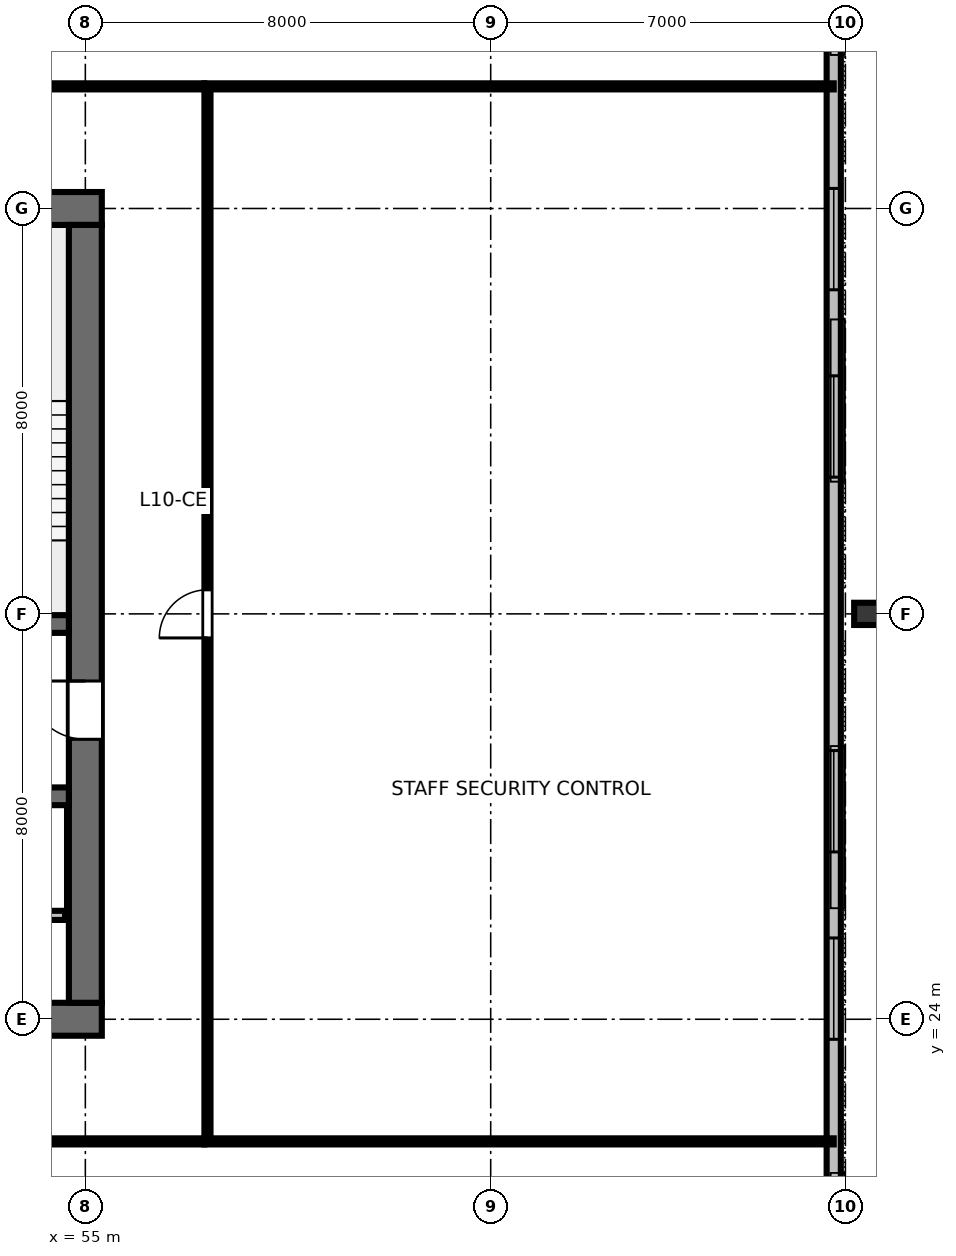
"""IFC4 building model, lengths in metres.
Left out: names, types, materials, properties, quantities, classifications, styles, units other than length and angle.
Written with IfcOpenShell. Run it as: python <this file> out.ifc"""

import sys

from ifc_helpers import new_model, si_unit, direction, frame, frame_2d, origin, origin_2d, place, context, subcontext, project, spatial, rectangle, i_section, extrude, element, fill, save


model = new_model("IFC4")
c1 = context("Model", 3, precision=1e-05, world=origin(), true_north=direction((0.0, 1.0)))
c2 = subcontext(c1, "Body", "Model", "MODEL_VIEW")
j1 = project(units=[si_unit("LENGTHUNIT", "METRE"), si_unit("PLANEANGLEUNIT", "RADIAN")], contexts=[c1])
p1 = place(None, origin())
s1 = spatial("IfcSite", under=j1, at=p1, CompositionType="ELEMENT")
p2 = place(p1, origin())
s2 = spatial("IfcBuilding", under=s1, at=p2, CompositionType="ELEMENT")
p3 = place(p2, frame((0.0, 0.0, 42.4)))
s3 = spatial("IfcBuildingStorey", under=s2, at=p3, CompositionType="ELEMENT", Elevation=42.4)
p4 = place(p3, frame((36.675, 24.0, 0.0), z_axis=(0.0, 0.0, 1.0), x_axis=(1.0, 0.0, 0.0)))
e1 = element("IfcWall", 1, at=p4, inside=s3, PredefinedType="SHEAR", context=c2, shape_type="SweptSolid", body=[
    extrude(rectangle(XDim=18.65, YDim=0.65, at=frame_2d((9.325, 0.0))), origin(), (0.0, 0.0, 1.0), 3.36),
])
p5 = place(p4, frame((5.725, 0.0, 0.0)))
e2 = element("IfcOpeningElement", 2, at=p5, cuts=e1, PredefinedType="OPENING", context=c2, shape_type="SweptSolid", body=[
    extrude(rectangle(XDim=1.6, YDim=2.15, at=frame_2d((0.8, 1.075))), frame((0.0, 0.335, 0.0), z_axis=(0.0, -1.0, 0.0), x_axis=(1.0, 0.0, 0.0)), (0.0, 0.0, 1.0), 0.67),
])
p6 = place(p4, frame((12.125, 0.0, 0.0)))
e3 = element("IfcOpeningElement", 3, at=p6, cuts=e1, PredefinedType="OPENING", context=c2, shape_type="SweptSolid", body=[
    extrude(rectangle(XDim=1.6, YDim=2.15, at=frame_2d((0.8, 1.075))), frame((0.0, 0.335, 0.0), z_axis=(0.0, -1.0, 0.0), x_axis=(1.0, 0.0, 0.0)), (0.0, 0.0, 1.0), 0.67),
])
p7 = place(p3, frame((36.675, 40.0, 0.0), z_axis=(0.0, 0.0, 1.0), x_axis=(1.0, 0.0, 0.0)))
e4 = element("IfcWall", 4, at=p7, inside=s3, PredefinedType="SHEAR", context=c2, shape_type="SweptSolid", body=[
    extrude(rectangle(XDim=18.65, YDim=0.65, at=frame_2d((9.325, 0.0))), origin(), (0.0, 0.0, 1.0), 3.36),
])
p8 = place(p7, frame((10.625, 0.0, 0.0)))
e5 = element("IfcOpeningElement", 5, at=p8, cuts=e4, PredefinedType="OPENING", context=c2, shape_type="SweptSolid", body=[
    extrude(rectangle(XDim=1.0, YDim=2.15, at=frame_2d((0.5, 1.075))), frame((0.0, 0.335, 0.0), z_axis=(0.0, -1.0, 0.0), x_axis=(1.0, 0.0, 0.0)), (0.0, 0.0, 1.0), 0.67),
])
p9 = place(p3, frame((55.0, 24.325, 0.0), z_axis=(0.0, 0.0, 1.0), x_axis=(0.0, 1.0, 0.0)))
e6 = element("IfcWall", 6, at=p9, inside=s3, PredefinedType="SHEAR", context=c2, shape_type="SweptSolid", body=[
    extrude(rectangle(XDim=15.35, YDim=0.65, at=frame_2d((7.675, 0.0))), origin(), (0.0, 0.0, 1.0), 3.36),
])
p10 = place(p9, frame((5.2, 0.0, 0.0)))
e7 = element("IfcOpeningElement", 7, at=p10, cuts=e6, PredefinedType="OPENING", context=c2, shape_type="SweptSolid", body=[
    extrude(rectangle(XDim=1.15, YDim=2.15, at=frame_2d((0.575, 1.075))), frame((0.0, 0.335, 0.0), z_axis=(0.0, -1.0, 0.0), x_axis=(1.0, 0.0, 0.0)), (0.0, 0.0, 1.0), 0.67),
])
p11 = place(p3, frame((37.325, 31.8, 0.0), z_axis=(0.0, 0.0, 1.0), x_axis=(1.0, 0.0, 0.0)))
e8 = element("IfcWall", 8, at=p11, inside=s3, PredefinedType="SHEAR", context=c2, shape_type="SweptSolid", body=[
    extrude(rectangle(XDim=17.35, YDim=0.35, at=frame_2d((8.675, 0.0))), origin(), (0.0, 0.0, 1.0), 3.36),
])
p12 = place(p11, frame((0.725, 0.0, 0.0)))
e9 = element("IfcOpeningElement", 9, at=p12, cuts=e8, PredefinedType="OPENING", context=c2, shape_type="SweptSolid", body=[
    extrude(rectangle(XDim=1.1, YDim=2.15, at=frame_2d((0.55, 1.075))), frame((0.0, 0.185, 0.0), z_axis=(0.0, -1.0, 0.0), x_axis=(1.0, 0.0, 0.0)), (0.0, 0.0, 1.0), 0.37),
])
p13 = place(p11, frame((14.625, 0.0, 0.0)))
e10 = element("IfcOpeningElement", 10, at=p13, cuts=e8, PredefinedType="OPENING", context=c2, shape_type="SweptSolid", body=[
    extrude(rectangle(XDim=1.1, YDim=2.15, at=frame_2d((0.55, 1.075))), frame((0.0, 0.185, 0.0), z_axis=(0.0, -1.0, 0.0), x_axis=(1.0, 0.0, 0.0)), (0.0, 0.0, 1.0), 0.37),
])
p14 = place(p3, frame((37.325, 28.4, 0.0), z_axis=(0.0, 0.0, 1.0), x_axis=(1.0, 0.0, 0.0)))
e11 = element("IfcWall", 11, at=p14, inside=s3, PredefinedType="SHEAR", context=c2, shape_type="SweptSolid", body=[
    extrude(rectangle(XDim=17.35, YDim=0.35, at=frame_2d((8.675, 0.0))), origin(), (0.0, 0.0, 1.0), 3.36),
])
p15 = place(p3, frame((70.43, 32.0, 0.0), z_axis=(0.0, 0.0, 1.0), x_axis=(0.0, 1.0, 0.0)))
e12 = element("IfcColumn", 12, at=p15, inside=s3, PredefinedType="COLUMN", context=c2, shape_type="SweptSolid", body=[
    extrude(i_section(OverallWidth=0.439, OverallDepth=0.514, WebThickness=0.06, FlangeThickness=0.097, FilletRadius=0.025, at=origin_2d()), origin(), (0.0, 0.0, 1.0), 3.148),
])
p16 = place(p3, frame((69.77, 14.26, 0.0), z_axis=(0.0, 0.0, 1.0), x_axis=(0.0, 1.0, 0.0)))
e13 = element("IfcWall", 13, at=p16, inside=s3, PredefinedType="STANDARD", context=c2, shape_type="SweptSolid", body=[
    extrude(rectangle(XDim=35.48, YDim=0.28, at=frame_2d((17.74, 0.0))), origin(), (0.0, 0.0, 1.0), 3.15),
])
p17 = place(p16, frame((1.949, 0.0, 0.8)))
e14 = element("IfcOpeningElement", 14, at=p17, cuts=e13, PredefinedType="OPENING", context=c2, shape_type="SweptSolid", body=[
    extrude(rectangle(XDim=2.0, YDim=1.95, at=frame_2d((1.0, 0.975))), frame((0.0, 0.15, 0.0), z_axis=(0.0, -1.0, 0.0), x_axis=(1.0, 0.0, 0.0)), (0.0, 0.0, 1.0), 0.3),
])
p18 = place(p16, frame((9.344, 0.0, 0.8)))
e15 = element("IfcOpeningElement", 15, at=p18, cuts=e13, PredefinedType="OPENING", context=c2, shape_type="SweptSolid", body=[
    extrude(rectangle(XDim=2.0, YDim=1.95, at=frame_2d((1.0, 0.975))), frame((0.0, 0.15, 0.0), z_axis=(0.0, -1.0, 0.0), x_axis=(1.0, 0.0, 0.0)), (0.0, 0.0, 1.0), 0.3),
])
p19 = place(p16, frame((13.042, 0.0, 0.8)))
e16 = element("IfcOpeningElement", 16, at=p19, cuts=e13, PredefinedType="OPENING", context=c2, shape_type="SweptSolid", body=[
    extrude(rectangle(XDim=2.0, YDim=1.95, at=frame_2d((1.0, 0.975))), frame((0.0, 0.15, 0.0), z_axis=(0.0, -1.0, 0.0), x_axis=(1.0, 0.0, 0.0)), (0.0, 0.0, 1.0), 0.3),
])
p20 = place(p16, frame((20.438, 0.0, 0.8)))
e17 = element("IfcOpeningElement", 17, at=p20, cuts=e13, PredefinedType="OPENING", context=c2, shape_type="SweptSolid", body=[
    extrude(rectangle(XDim=2.0, YDim=1.95, at=frame_2d((1.0, 0.975))), frame((0.0, 0.15, 0.0), z_axis=(0.0, -1.0, 0.0), x_axis=(1.0, 0.0, 0.0)), (0.0, 0.0, 1.0), 0.3),
])
p21 = place(p16, frame((24.135, 0.0, 0.8)))
e18 = element("IfcOpeningElement", 18, at=p21, cuts=e13, PredefinedType="OPENING", context=c2, shape_type="SweptSolid", body=[
    extrude(rectangle(XDim=2.0, YDim=1.95, at=frame_2d((1.0, 0.975))), frame((0.0, 0.15, 0.0), z_axis=(0.0, -1.0, 0.0), x_axis=(1.0, 0.0, 0.0)), (0.0, 0.0, 1.0), 0.3),
])
p22 = place(p16, frame((31.531, 0.0, 0.8)))
e19 = element("IfcOpeningElement", 19, at=p22, cuts=e13, PredefinedType="OPENING", context=c2, shape_type="SweptSolid", body=[
    extrude(rectangle(XDim=2.0, YDim=1.95, at=frame_2d((1.0, 0.975))), frame((0.0, 0.15, 0.0), z_axis=(0.0, -1.0, 0.0), x_axis=(1.0, 0.0, 0.0)), (0.0, 0.0, 1.0), 0.3),
])
p23 = place(p3, frame((37.4, 26.05, 0.0), z_axis=(0.0, 0.0, 1.0), x_axis=(1.0, 0.0, 0.0)))
e20 = element("IfcWall", 20, at=p23, inside=s3, PredefinedType="PARTITIONING", context=c2, shape_type="SweptSolid", body=[
    extrude(rectangle(XDim=17.2, YDim=0.18, at=frame_2d((8.6, 0.0))), origin(), (0.0, 0.0, 1.0), 3.15),
])
p24 = place(p23, frame((1.1, 0.0, 0.0)))
e21 = element("IfcOpeningElement", 21, at=p24, cuts=e20, PredefinedType="OPENING", context=c2, shape_type="SweptSolid", body=[
    extrude(rectangle(XDim=1.05, YDim=2.15, at=frame_2d((0.525, 1.075))), frame((0.0, 0.1, 0.0), z_axis=(0.0, -1.0, 0.0), x_axis=(1.0, 0.0, 0.0)), (0.0, 0.0, 1.0), 0.2),
])
p25 = place(p23, frame((3.0, 0.0, 0.0)))
e22 = element("IfcOpeningElement", 22, at=p25, cuts=e20, PredefinedType="OPENING", context=c2, shape_type="SweptSolid", body=[
    extrude(rectangle(XDim=1.05, YDim=2.15, at=frame_2d((0.525, 1.075))), frame((0.0, 0.1, 0.0), z_axis=(0.0, -1.0, 0.0), x_axis=(1.0, 0.0, 0.0)), (0.0, 0.0, 1.0), 0.2),
])
p26 = place(p3, frame((34.65, 21.59, 0.0), z_axis=(0.0, 0.0, 1.0), x_axis=(1.0, 0.0, 0.0)))
e23 = element("IfcWall", 23, at=p26, inside=s3, PredefinedType="PARTITIONING", context=c2, shape_type="SweptSolid", body=[
    extrude(rectangle(XDim=22.7, YDim=0.12, at=frame_2d((11.35, 0.0))), origin(), (0.0, 0.0, 1.0), 2.43),
])
p27 = place(p26, frame((2.959, 0.0, 0.0)))
e24 = element("IfcOpeningElement", 24, at=p27, cuts=e23, PredefinedType="OPENING", context=c2, shape_type="SweptSolid", body=[
    extrude(rectangle(XDim=0.95, YDim=2.15, at=frame_2d((0.475, 1.075))), frame((0.0, 0.07, 0.0), z_axis=(0.0, -1.0, 0.0), x_axis=(1.0, 0.0, 0.0)), (0.0, 0.0, 1.0), 0.14),
])
p28 = place(p26, frame((7.709, 0.0, 0.0)))
e25 = element("IfcOpeningElement", 25, at=p28, cuts=e23, PredefinedType="OPENING", context=c2, shape_type="SweptSolid", body=[
    extrude(rectangle(XDim=0.95, YDim=2.15, at=frame_2d((0.475, 1.075))), frame((0.0, 0.07, 0.0), z_axis=(0.0, -1.0, 0.0), x_axis=(1.0, 0.0, 0.0)), (0.0, 0.0, 1.0), 0.14),
])
p29 = place(p26, frame((11.204, 0.0, 0.0)))
e26 = element("IfcOpeningElement", 26, at=p29, cuts=e23, PredefinedType="OPENING", context=c2, shape_type="SweptSolid", body=[
    extrude(rectangle(XDim=0.95, YDim=2.15, at=frame_2d((0.475, 1.075))), frame((0.0, 0.07, 0.0), z_axis=(0.0, -1.0, 0.0), x_axis=(1.0, 0.0, 0.0)), (0.0, 0.0, 1.0), 0.14),
])
p30 = place(p26, frame((17.665, 0.0, 0.0)))
e27 = element("IfcOpeningElement", 27, at=p30, cuts=e23, PredefinedType="OPENING", context=c2, shape_type="SweptSolid", body=[
    extrude(rectangle(XDim=0.95, YDim=2.15, at=frame_2d((0.475, 1.075))), frame((0.0, 0.07, 0.0), z_axis=(0.0, -1.0, 0.0), x_axis=(1.0, 0.0, 0.0)), (0.0, 0.0, 1.0), 0.14),
])
p31 = place(p3, frame((34.65, 42.41, 0.0), z_axis=(0.0, 0.0, 1.0), x_axis=(1.0, 0.0, 0.0)))
e28 = element("IfcWall", 28, at=p31, inside=s3, PredefinedType="PARTITIONING", context=c2, shape_type="SweptSolid", body=[
    extrude(rectangle(XDim=22.7, YDim=0.12, at=frame_2d((11.35, 0.0))), origin(), (0.0, 0.0, 1.0), 2.43),
])
p32 = place(p31, frame((10.875, 0.0, 0.0)))
e29 = element("IfcOpeningElement", 29, at=p32, cuts=e28, PredefinedType="OPENING", context=c2, shape_type="SweptSolid", body=[
    extrude(rectangle(XDim=0.95, YDim=2.15, at=frame_2d((0.475, 1.075))), frame((0.0, 0.07, 0.0), z_axis=(0.0, -1.0, 0.0), x_axis=(1.0, 0.0, 0.0)), (0.0, 0.0, 1.0), 0.14),
])
p33 = place(p3, frame((57.41, 21.65, 0.0), z_axis=(0.0, 0.0, 1.0), x_axis=(0.0, 1.0, 0.0)))
e30 = element("IfcWall", 30, at=p33, inside=s3, PredefinedType="PARTITIONING", context=c2, shape_type="SweptSolid", body=[
    extrude(rectangle(XDim=20.7, YDim=0.12, at=frame_2d((10.35, 0.0))), origin(), (0.0, 0.0, 1.0), 2.43),
])
p34 = place(p33, frame((9.875, 0.0, 0.0)))
e31 = element("IfcOpeningElement", 31, at=p34, cuts=e30, PredefinedType="OPENING", context=c2, shape_type="SweptSolid", body=[
    extrude(rectangle(XDim=0.95, YDim=2.15, at=frame_2d((0.475, 1.075))), frame((0.0, 0.07, 0.0), z_axis=(0.0, -1.0, 0.0), x_axis=(1.0, 0.0, 0.0)), (0.0, 0.0, 1.0), 0.14),
])
for number, where, z_axis, x_axis in (
    (32, (57.35, 21.59, 0.0), (0.0, 0.0, 1.0), (1.0, 0.0, 0.0)),
    (33, (57.35, 42.41, 0.0), (0.0, 0.0, 1.0), (1.0, 0.0, 0.0)),
):
    element("IfcWall", number, at=place(p3, frame(where, z_axis=z_axis, x_axis=x_axis)), inside=s3, PredefinedType="PARTITIONING", context=c2, shape_type="SweptSolid", body=[
        extrude(rectangle(XDim=12.42, YDim=0.12, at=frame_2d((6.21, 0.0))), origin(), (0.0, 0.0, 1.0), 2.43),
    ])
p35 = place(p18, origin())
e34 = element("IfcWindow", 34, at=p35, inside=s3, PartitioningType="SINGLE_PANEL", PredefinedType="WINDOW", context=c2, shape_type="SweptSolid", body=[
    extrude(rectangle(XDim=2.0, YDim=1.95, at=frame_2d((1.0, 0.975))), frame((0.0, 0.03, 0.0), z_axis=(0.0, -1.0, 0.0), x_axis=(1.0, 0.0, 0.0)), (0.0, 0.0, 1.0), 0.06),
])
fill(e15, e34)
p36 = place(p19, origin())
e35 = element("IfcWindow", 35, at=p36, inside=s3, PartitioningType="SINGLE_PANEL", PredefinedType="WINDOW", context=c2, shape_type="SweptSolid", body=[
    extrude(rectangle(XDim=2.0, YDim=1.95, at=frame_2d((1.0, 0.975))), frame((0.0, 0.03, 0.0), z_axis=(0.0, -1.0, 0.0), x_axis=(1.0, 0.0, 0.0)), (0.0, 0.0, 1.0), 0.06),
])
fill(e16, e35)
p37 = place(p20, origin())
e36 = element("IfcWindow", 36, at=p37, inside=s3, PartitioningType="SINGLE_PANEL", PredefinedType="WINDOW", context=c2, shape_type="SweptSolid", body=[
    extrude(rectangle(XDim=2.0, YDim=1.95, at=frame_2d((1.0, 0.975))), frame((0.0, 0.03, 0.0), z_axis=(0.0, -1.0, 0.0), x_axis=(1.0, 0.0, 0.0)), (0.0, 0.0, 1.0), 0.06),
])
fill(e17, e36)
p38 = place(p21, origin())
e37 = element("IfcWindow", 37, at=p38, inside=s3, PartitioningType="SINGLE_PANEL", PredefinedType="WINDOW", context=c2, shape_type="SweptSolid", body=[
    extrude(rectangle(XDim=2.0, YDim=1.95, at=frame_2d((1.0, 0.975))), frame((0.0, 0.03, 0.0), z_axis=(0.0, -1.0, 0.0), x_axis=(1.0, 0.0, 0.0)), (0.0, 0.0, 1.0), 0.06),
])
fill(e18, e37)
p39 = place(p10, origin())
e38 = element("IfcDoor", 38, at=p39, inside=s3, OperationType="SINGLE_SWING_RIGHT", PredefinedType="DOOR", context=c2, shape_type="SweptSolid", body=[
    extrude(rectangle(XDim=1.15, YDim=2.15, at=frame_2d((0.575, 1.075))), frame((0.0, 0.025, 0.0), z_axis=(0.0, -1.0, 0.0), x_axis=(1.0, 0.0, 0.0)), (0.0, 0.0, 1.0), 0.05),
])
fill(e7, e38)
p40 = place(p34, origin())
e39 = element("IfcDoor", 39, at=p40, inside=s3, OperationType="SINGLE_SWING_LEFT", PredefinedType="DOOR", context=c2, shape_type="SweptSolid", body=[
    extrude(rectangle(XDim=0.95, YDim=2.15, at=frame_2d((0.475, 1.075))), frame((0.0, 0.025, 0.0), z_axis=(0.0, -1.0, 0.0), x_axis=(1.0, 0.0, 0.0)), (0.0, 0.0, 1.0), 0.05),
])
fill(e31, e39)
save(model, sys.argv[1])
